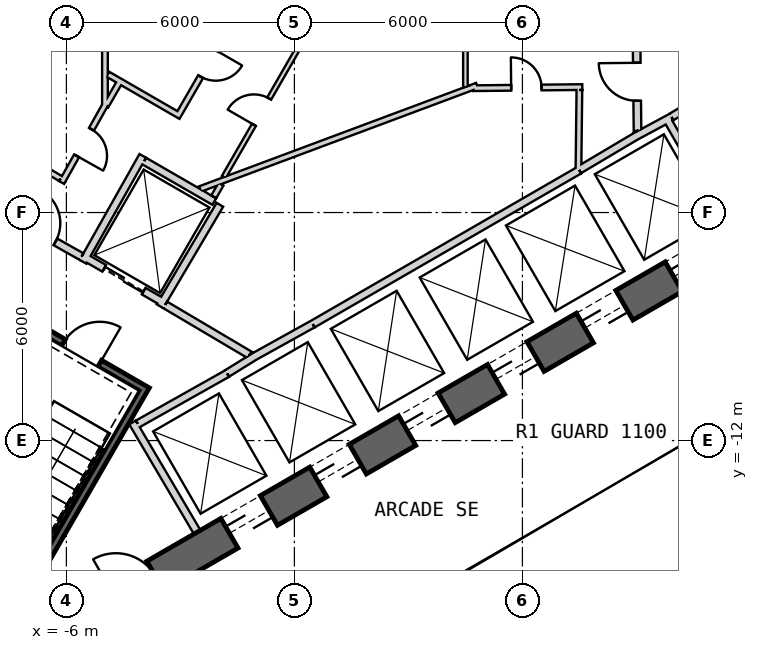
"""IFC4 building model, lengths in metres.
Left out: names, types, materials, properties, quantities, classifications, styles, units other than length and angle.
Written with IfcOpenShell. Run it as: python <this file> out.ifc"""

import sys

from ifc_helpers import new_model, si_unit, direction, frame, frame_2d, origin, place, context, subcontext, project, spatial, rectangle, extrude, element, fill, save


model = new_model("IFC4")
c1 = context("Model", 3, precision=1e-05, world=origin(), true_north=direction((0.0, 1.0)))
c2 = subcontext(c1, "Body", "Model", "MODEL_VIEW")
j1 = project(units=[si_unit("LENGTHUNIT", "METRE"), si_unit("PLANEANGLEUNIT", "RADIAN")], contexts=[c1])
p1 = place(None, origin())
s1 = spatial("IfcSite", under=j1, at=p1, CompositionType="ELEMENT")
p2 = place(p1, origin())
s2 = spatial("IfcBuilding", under=s1, at=p2, CompositionType="ELEMENT")
p3 = place(p2, frame((0.0, 0.0, 15.5)))
s3 = spatial("IfcBuildingStorey", under=s2, at=p3, CompositionType="ELEMENT", Elevation=15.5)
p4 = place(p3, frame((-7.825, -17.97, 0.0), z_axis=(0.0, 0.0, 1.0), x_axis=(0.866028369851, 0.499994862586, 0.0)))
e1 = element("IfcWall", 1, at=p4, inside=s3, PredefinedType="SHEAR", context=c2, shape_type="SweptSolid", body=[
    extrude(rectangle(XDim=31.523, YDim=0.9, at=frame_2d((15.762, 0.0))), origin(), (0.0, 0.0, 1.0), 6.0),
])
p5 = place(p4, frame((7.062, 0.0, 0.0)))
e2 = element("IfcOpeningElement", 2, at=p5, cuts=e1, PredefinedType="OPENING", context=c2, shape_type="SweptSolid", body=[
    extrude(rectangle(XDim=1.2, YDim=2.4, at=frame_2d((0.6, 1.2))), frame((0.0, 0.46, 0.0), z_axis=(0.0, -1.0, 0.0), x_axis=(1.0, 0.0, 0.0)), (0.0, 0.0, 1.0), 0.92),
])
p6 = place(p4, frame((9.762, 0.0, 0.0)))
e3 = element("IfcOpeningElement", 3, at=p6, cuts=e1, PredefinedType="OPENING", context=c2, shape_type="SweptSolid", body=[
    extrude(rectangle(XDim=1.2, YDim=2.4, at=frame_2d((0.6, 1.2))), frame((0.0, 0.46, 0.0), z_axis=(0.0, -1.0, 0.0), x_axis=(1.0, 0.0, 0.0)), (0.0, 0.0, 1.0), 0.92),
])
p7 = place(p4, frame((12.462, 0.0, 0.0)))
e4 = element("IfcOpeningElement", 4, at=p7, cuts=e1, PredefinedType="OPENING", context=c2, shape_type="SweptSolid", body=[
    extrude(rectangle(XDim=1.2, YDim=2.4, at=frame_2d((0.6, 1.2))), frame((0.0, 0.46, 0.0), z_axis=(0.0, -1.0, 0.0), x_axis=(1.0, 0.0, 0.0)), (0.0, 0.0, 1.0), 0.92),
])
p8 = place(p4, frame((15.162, 0.0, 0.0)))
e5 = element("IfcOpeningElement", 5, at=p8, cuts=e1, PredefinedType="OPENING", context=c2, shape_type="SweptSolid", body=[
    extrude(rectangle(XDim=1.2, YDim=2.4, at=frame_2d((0.6, 1.2))), frame((0.0, 0.46, 0.0), z_axis=(0.0, -1.0, 0.0), x_axis=(1.0, 0.0, 0.0)), (0.0, 0.0, 1.0), 0.92),
])
p9 = place(p4, frame((17.862, 0.0, 0.0)))
e6 = element("IfcOpeningElement", 6, at=p9, cuts=e1, PredefinedType="OPENING", context=c2, shape_type="SweptSolid", body=[
    extrude(rectangle(XDim=1.2, YDim=2.4, at=frame_2d((0.6, 1.2))), frame((0.0, 0.46, 0.0), z_axis=(0.0, -1.0, 0.0), x_axis=(1.0, 0.0, 0.0)), (0.0, 0.0, 1.0), 0.92),
])
p10 = place(p4, frame((20.562, 0.0, 0.0)))
e7 = element("IfcOpeningElement", 7, at=p10, cuts=e1, PredefinedType="OPENING", context=c2, shape_type="SweptSolid", body=[
    extrude(rectangle(XDim=1.2, YDim=2.4, at=frame_2d((0.6, 1.2))), frame((0.0, 0.46, 0.0), z_axis=(0.0, -1.0, 0.0), x_axis=(1.0, 0.0, 0.0)), (0.0, 0.0, 1.0), 0.92),
])
p11 = place(p4, frame((26.712, 0.0, 0.0)))
e8 = element("IfcOpeningElement", 8, at=p11, cuts=e1, PredefinedType="OPENING", context=c2, shape_type="SweptSolid", body=[
    extrude(rectangle(XDim=1.2, YDim=2.4, at=frame_2d((0.6, 1.2))), frame((0.0, 0.46, 0.0), z_axis=(0.0, -1.0, 0.0), x_axis=(1.0, 0.0, 0.0)), (0.0, 0.0, 1.0), 0.92),
])
p12 = place(p4, frame((3.612, 0.0, 0.0)))
e9 = element("IfcOpeningElement", 9, at=p12, cuts=e1, PredefinedType="OPENING", context=c2, shape_type="SweptSolid", body=[
    extrude(rectangle(XDim=1.2, YDim=2.4, at=frame_2d((0.6, 1.2))), frame((0.0, 0.46, 0.0), z_axis=(0.0, -1.0, 0.0), x_axis=(1.0, 0.0, 0.0)), (0.0, 0.0, 1.0), 0.92),
])
p13 = place(p3, frame((0.483, -8.936, 0.0), z_axis=(0.0, 0.0, 1.0), x_axis=(0.866030989016, 0.499990325971, 0.0)))
e10 = element("IfcWall", 10, at=p13, inside=s3, PredefinedType="PLUMBINGWALL", context=c2, shape_type="SweptSolid", body=[
    extrude(rectangle(XDim=8.1, YDim=0.2, at=frame_2d((4.05, 0.0))), origin(), (0.0, 0.0, 1.0), 5.7),
])
p14 = place(p3, frame((9.795, -3.525, 0.0), z_axis=(0.0, 0.0, 1.0), x_axis=(0.499984717929, -0.866034226713, 0.0)))
e11 = element("IfcWall", 11, at=p14, inside=s3, PredefinedType="PLUMBINGWALL", context=c2, shape_type="SweptSolid", body=[
    extrude(rectangle(XDim=3.25, YDim=0.2, at=frame_2d((1.625, 0.0))), origin(), (0.0, 0.0, 1.0), 5.7),
])
p15 = place(p3, frame((8.974, -3.999, 0.0), z_axis=(0.0, 0.0, 1.0), x_axis=(0.880907015104, 0.473289373154, 0.0)))
e12 = element("IfcWall", 12, at=p15, inside=s3, PredefinedType="PLUMBINGWALL", context=c2, shape_type="SweptSolid", body=[
    extrude(rectangle(XDim=1.078, YDim=0.2, at=frame_2d((0.539, 0.0))), origin(), (0.0, 0.0, 1.0), 5.7),
])
p16 = place(p3, frame((7.493, -4.878, 0.0), z_axis=(0.0, 0.0, 1.0), x_axis=(0.859981807212, 0.510324691999, 0.0)))
e13 = element("IfcWall", 13, at=p16, inside=s3, PredefinedType="PLUMBINGWALL", context=c2, shape_type="SweptSolid", body=[
    extrude(rectangle(XDim=1.845, YDim=0.2, at=frame_2d((0.922, 0.0))), origin(), (0.0, 0.0, 1.0), 5.7),
])
p17 = place(p3, frame((-2.558, -14.409, 0.0), z_axis=(0.0, 0.0, 1.0), x_axis=(-0.507997497166, 0.861358544901, 0.0)))
e14 = element("IfcWall", 14, at=p17, inside=s3, PredefinedType="PLUMBINGWALL", context=c2, shape_type="SweptSolid", body=[
    extrude(rectangle(XDim=3.35, YDim=0.2, at=frame_2d((1.675, 0.0))), origin(), (0.0, 0.0, 1.0), 5.7),
])
p18 = place(p3, frame((-1.769, -10.237, 0.0), z_axis=(0.0, 0.0, 1.0), x_axis=(-0.871534483978, -0.490334215854, 0.0)))
e15 = element("IfcWall", 15, at=p18, inside=s3, PredefinedType="PLUMBINGWALL", context=c2, shape_type="SweptSolid", body=[
    extrude(rectangle(XDim=2.7, YDim=0.2, at=frame_2d((1.35, 0.0))), origin(), (0.0, 0.0, 1.0), 5.7),
])
p19 = place(p3, frame((-1.024, -9.771, 0.0), z_axis=(0.0, 0.0, 1.0), x_axis=(-0.850348075135, -0.526220629693, 0.0)))
e16 = element("IfcWall", 16, at=p19, inside=s3, PredefinedType="PLUMBINGWALL", context=c2, shape_type="SweptSolid", body=[
    extrude(rectangle(XDim=0.878, YDim=0.2, at=frame_2d((0.439, 0.0))), origin(), (0.0, 0.0, 1.0), 5.7),
])
p20 = place(p3, frame((-1.13, -9.831, 0.0), z_axis=(0.0, 0.0, 1.0), x_axis=(0.874269620932, 0.485440655401, 0.0)))
e17 = element("IfcWall", 17, at=p20, inside=s3, PredefinedType="PLUMBINGWALL", context=c2, shape_type="SweptSolid", body=[
    extrude(rectangle(XDim=1.845, YDim=0.2, at=frame_2d((0.922, 0.0))), origin(), (0.0, 0.0, 1.0), 5.7),
])
p21 = place(p3, frame((-3.905, -10.563, -0.3), z_axis=(0.0, 0.0, 1.0), x_axis=(-0.500012932018, -0.866017937352, 0.0)))
e18 = element("IfcWall", 18, at=p21, inside=s3, PredefinedType="SHEAR", context=c2, shape_type="SweptSolid", body=[
    extrude(rectangle(XDim=8.1, YDim=0.2, at=frame_2d((4.05, 0.0))), origin(), (0.0, 0.0, 1.0), 6.0),
])
p22 = place(p3, frame((-4.041, -10.599, -0.3), z_axis=(0.0, 0.0, 1.0), x_axis=(-0.866047807691, 0.499961193289, 0.0)))
e19 = element("IfcWall", 19, at=p22, inside=s3, PredefinedType="SHEAR", context=c2, shape_type="SweptSolid", body=[
    extrude(rectangle(XDim=3.6, YDim=0.2, at=frame_2d((1.8, 0.0))), origin(), (0.0, 0.0, 1.0), 6.0),
])
p23 = place(p22, frame((1.25, 0.0, 0.3)))
e20 = element("IfcOpeningElement", 20, at=p23, cuts=e19, PredefinedType="OPENING", context=c2, shape_type="SweptSolid", body=[
    extrude(rectangle(XDim=1.1, YDim=2.1, at=frame_2d((0.55, 1.05))), frame((0.0, 0.11, 0.0), z_axis=(0.0, -1.0, 0.0), x_axis=(1.0, 0.0, 0.0)), (0.0, 0.0, 1.0), 0.22),
])
p24 = place(p3, frame((-3.446, -8.368, 0.0), z_axis=(0.0, 0.0, 1.0), x_axis=(-0.866024647952, 0.500001309137, 0.0)))
e21 = element("IfcWall", 21, at=p24, inside=s3, PredefinedType="PLUMBINGWALL", context=c2, shape_type="SweptSolid", body=[
    extrude(rectangle(XDim=2.4, YDim=0.2, at=frame_2d((1.2, 0.0))), origin(), (0.0, 0.0, 1.0), 5.7),
])
p25 = place(p24, frame((0.6, 0.0, 0.0)))
e22 = element("IfcOpeningElement", 22, at=p25, cuts=e21, PredefinedType="OPENING", context=c2, shape_type="SweptSolid", body=[
    extrude(rectangle(XDim=1.2, YDim=2.4, at=frame_2d((0.6, 1.2))), frame((0.0, 0.11, 0.0), z_axis=(0.0, -1.0, 0.0), x_axis=(1.0, 0.0, 0.0)), (0.0, 0.0, 1.0), 0.22),
])
p26 = place(p3, frame((-1.961, -5.796, 0.0), z_axis=(0.0, 0.0, 1.0), x_axis=(-0.508647062354, -0.860975125052, 0.0)))
e23 = element("IfcWall", 23, at=p26, inside=s3, PredefinedType="PLUMBINGWALL", context=c2, shape_type="SweptSolid", body=[
    extrude(rectangle(XDim=3.1, YDim=0.2, at=frame_2d((1.55, 0.0))), origin(), (0.0, 0.0, 1.0), 5.7),
])
p27 = place(p3, frame((-3.99, -4.509, 0.0), z_axis=(0.0, 0.0, 1.0), x_axis=(-0.491358283181, -0.870957540612, 0.0)))
e24 = element("IfcWall", 24, at=p27, inside=s3, PredefinedType="PLUMBINGWALL", context=c2, shape_type="SweptSolid", body=[
    extrude(rectangle(XDim=3.2, YDim=0.2, at=frame_2d((1.6, 0.0))), origin(), (0.0, 0.0, 1.0), 5.7),
])
p28 = place(p3, frame((-3.953, -4.646, 0.0), z_axis=(0.0, 0.0, 1.0), x_axis=(0.866040491692, -0.499973866067, 0.0)))
e25 = element("IfcWall", 25, at=p28, inside=s3, PredefinedType="PLUMBINGWALL", context=c2, shape_type="SweptSolid", body=[
    extrude(rectangle(XDim=2.129, YDim=0.2, at=frame_2d((1.065, 0.0))), origin(), (0.0, 0.0, 1.0), 5.7),
])
p29 = place(p3, frame((12.245, -2.109, 0.0), z_axis=(0.0, 0.0, 1.0), x_axis=(-0.860414880418, -0.509594185166, 0.0)))
e26 = element("IfcWall", 26, at=p29, inside=s3, PredefinedType="PARTITIONING", context=c2, shape_type="SweptSolid", body=[
    extrude(rectangle(XDim=2.7, YDim=0.2, at=frame_2d((1.35, 0.0))), origin(), (0.0, 0.0, 1.0), 5.7),
])
p30 = place(p3, frame((9.029, -3.851, 0.0), z_axis=(0.0, 0.0, 1.0), x_axis=(-0.010783593937, 0.99994185536, 0.0)))
e27 = element("IfcWall", 27, at=p30, inside=s3, PredefinedType="PARTITIONING", context=c2, shape_type="SweptSolid", body=[
    extrude(rectangle(XDim=2.581, YDim=0.2, at=frame_2d((1.291, 0.0))), origin(), (0.0, 0.0, 1.0), 5.7),
])
p31 = place(p30, frame((0.791, 0.0, 0.0)))
e28 = element("IfcOpeningElement", 28, at=p31, cuts=e27, PredefinedType="OPENING", context=c2, shape_type="SweptSolid", body=[
    extrude(rectangle(XDim=1.0, YDim=2.1, at=frame_2d((0.5, 1.05))), frame((0.0, 0.11, 0.0), z_axis=(0.0, -1.0, 0.0), x_axis=(1.0, 0.0, 0.0)), (0.0, 0.0, 1.0), 0.22),
])
p32 = place(p3, frame((-3.401, -8.43, 0.0), z_axis=(0.0, 0.0, 1.0), x_axis=(0.860615607571, -0.509255118781, 0.0)))
e29 = element("IfcWall", 29, at=p32, inside=s3, PredefinedType="PARTITIONING", context=c2, shape_type="SweptSolid", body=[
    extrude(rectangle(XDim=2.581, YDim=0.2, at=frame_2d((1.29, 0.0))), origin(), (0.0, 0.0, 1.0), 5.7),
])
p33 = place(p3, frame((-7.849, -5.894, 0.0), z_axis=(0.0, 0.0, 1.0), x_axis=(0.871363259478, -0.490638431059, 0.0)))
e30 = element("IfcWall", 30, at=p33, inside=s3, PredefinedType="PARTITIONING", context=c2, shape_type="SweptSolid", body=[
    extrude(rectangle(XDim=2.581, YDim=0.2, at=frame_2d((1.291, 0.0))), origin(), (0.0, 0.0, 1.0), 5.7),
])
p34 = place(p33, frame((0.791, 0.0, 0.0)))
e31 = element("IfcOpeningElement", 31, at=p34, cuts=e30, PredefinedType="OPENING", context=c2, shape_type="SweptSolid", body=[
    extrude(rectangle(XDim=1.0, YDim=2.1, at=frame_2d((0.5, 1.05))), frame((0.0, 0.11, 0.0), z_axis=(0.0, -1.0, 0.0), x_axis=(1.0, 0.0, 0.0)), (0.0, 0.0, 1.0), 0.22),
])
p35 = place(p3, frame((4.807, -2.659, 0.0), z_axis=(0.0, 0.0, 1.0), x_axis=(-0.936818342118, -0.349816228714, 0.0)))
e32 = element("IfcWall", 32, at=p35, inside=s3, PredefinedType="PLUMBINGWALL", context=c2, shape_type="SweptSolid", body=[
    extrude(rectangle(XDim=7.78, YDim=0.15, at=frame_2d((3.89, 0.0))), origin(), (0.0, 0.0, 1.0), 5.7),
])
p36 = place(p3, frame((0.182, -1.535, 0.0), z_axis=(0.0, 0.0, 1.0), x_axis=(-0.499988401207, -0.866032100247, 0.0)))
e33 = element("IfcWall", 33, at=p36, inside=s3, PredefinedType="PARTITIONING", context=c2, shape_type="SweptSolid", body=[
    extrude(rectangle(XDim=4.079, YDim=0.12, at=frame_2d((2.04, 0.0))), origin(), (0.0, 0.0, 1.0), 5.7),
])
p37 = place(p36, frame((1.691, 0.0, 0.0)))
e34 = element("IfcOpeningElement", 34, at=p37, cuts=e33, PredefinedType="OPENING", context=c2, shape_type="SweptSolid", body=[
    extrude(rectangle(XDim=0.8, YDim=2.1, at=frame_2d((0.4, 1.05))), frame((0.0, 0.07, 0.0), z_axis=(0.0, -1.0, 0.0), x_axis=(1.0, 0.0, 0.0)), (0.0, 0.0, 1.0), 0.14),
])
p38 = place(p3, frame((4.5, -2.7, 0.0), z_axis=(0.0, 0.0, 1.0), x_axis=(0.0, 1.0, 0.0)))
e35 = element("IfcWall", 35, at=p38, inside=s3, PredefinedType="PARTITIONING", context=c2, shape_type="SweptSolid", body=[
    extrude(rectangle(XDim=1.715, YDim=0.12, at=frame_2d((0.857, 0.0))), origin(), (0.0, 0.0, 1.0), 5.7),
])
p39 = place(p3, frame((-1.932, -5.256, 0.0), z_axis=(0.0, 0.0, 1.0), x_axis=(-0.499777709171, -0.866153705422, 0.0)))
e36 = element("IfcWall", 36, at=p39, inside=s3, PredefinedType="PLUMBINGWALL", context=c2, shape_type="SweptSolid", body=[
    extrude(rectangle(XDim=0.383, YDim=0.15, at=frame_2d((0.191, 0.0))), origin(), (0.0, 0.0, 1.0), 5.7),
])
p40 = place(p3, frame((7.575, -2.699, 0.0), z_axis=(0.0, 0.0, 1.0), x_axis=(-0.999947791603, -0.010218320275, 0.0)))
e37 = element("IfcWall", 37, at=p40, inside=s3, PredefinedType="PLUMBINGWALL", context=c2, shape_type="SweptSolid", body=[
    extrude(rectangle(XDim=2.867, YDim=0.15, at=frame_2d((1.434, 0.0))), origin(), (0.0, 0.0, 1.0), 5.7),
])
p41 = place(p40, frame((1.071, 0.0, 0.0)))
e38 = element("IfcOpeningElement", 38, at=p41, cuts=e37, PredefinedType="OPENING", context=c2, shape_type="SweptSolid", body=[
    extrude(rectangle(XDim=0.8, YDim=2.1, at=frame_2d((0.4, 1.05))), frame((0.0, 0.085, 0.0), z_axis=(0.0, -1.0, 0.0), x_axis=(1.0, 0.0, 0.0)), (0.0, 0.0, 1.0), 0.17),
])
p42 = place(p3, frame((7.475, -4.865, 0.0), z_axis=(0.0, 0.0, 1.0), x_axis=(0.011682810534, 0.99993175364, 0.0)))
e39 = element("IfcWall", 39, at=p42, inside=s3, PredefinedType="PLUMBINGWALL", context=c2, shape_type="SweptSolid", body=[
    extrude(rectangle(XDim=2.09, YDim=0.15, at=frame_2d((1.045, 0.0))), origin(), (0.0, 0.0, 1.0), 5.7),
])
p43 = place(p3, frame((-4.985, -3.235, 0.0), z_axis=(0.0, 0.0, 1.0), x_axis=(0.0, 1.0, 0.0)))
e40 = element("IfcWall", 40, at=p43, inside=s3, PredefinedType="PLUMBINGWALL", context=c2, shape_type="SweptSolid", body=[
    extrude(rectangle(XDim=6.469, YDim=0.15, at=frame_2d((3.235, 0.0))), origin(), (0.0, 0.0, 1.0), 5.7),
])
p44 = place(p3, frame((-6.125, -5.211, 0.0), z_axis=(0.0, 0.0, 1.0), x_axis=(0.488762436737, 0.87241691893, 0.0)))
e41 = element("IfcWall", 41, at=p44, inside=s3, PredefinedType="PLUMBINGWALL", context=c2, shape_type="SweptSolid", body=[
    extrude(rectangle(XDim=2.337, YDim=0.15, at=frame_2d((1.168, 0.0))), origin(), (0.0, 0.0, 1.0), 5.7),
])
p45 = place(p44, frame((0.806, 0.0, 0.0)))
e42 = element("IfcOpeningElement", 42, at=p45, cuts=e41, PredefinedType="OPENING", context=c2, shape_type="SweptSolid", body=[
    extrude(rectangle(XDim=0.8, YDim=2.1, at=frame_2d((0.4, 1.05))), frame((0.0, 0.085, 0.0), z_axis=(0.0, -1.0, 0.0), x_axis=(1.0, 0.0, 0.0)), (0.0, 0.0, 1.0), 0.17),
])
p46 = place(p3, frame((-7.95, -4.041, 0.0), z_axis=(0.0, 0.0, 1.0), x_axis=(0.860090281069, -0.510141851263, 0.0)))
e43 = element("IfcWall", 43, at=p46, inside=s3, PredefinedType="PLUMBINGWALL", context=c2, shape_type="SweptSolid", body=[
    extrude(rectangle(XDim=2.089, YDim=0.15, at=frame_2d((1.045, 0.0))), origin(), (0.0, 0.0, 1.0), 5.7),
])
p47 = place(p3, frame((-3.089, -3.5, 0.0), z_axis=(0.0, 0.0, 1.0), x_axis=(0.500025362525, 0.866010760229, 0.0)))
e44 = element("IfcWall", 44, at=p47, inside=s3, PredefinedType="PLUMBINGWALL", context=c2, shape_type="SweptSolid", body=[
    extrude(rectangle(XDim=3.209, YDim=0.15, at=frame_2d((1.604, 0.0))), origin(), (0.0, 0.0, 1.0), 5.7),
])
p48 = place(p47, frame((1.242, 0.0, 0.0)))
e45 = element("IfcOpeningElement", 45, at=p48, cuts=e44, PredefinedType="OPENING", context=c2, shape_type="SweptSolid", body=[
    extrude(rectangle(XDim=0.8, YDim=2.1, at=frame_2d((0.4, 1.05))), frame((0.0, 0.085, 0.0), z_axis=(0.0, -1.0, 0.0), x_axis=(1.0, 0.0, 0.0)), (0.0, 0.0, 1.0), 0.17),
])
p49 = place(p3, frame((-4.91, -2.361, 0.0), z_axis=(0.0, 0.0, 1.0), x_axis=(0.866022705876, -0.500004672885, 0.0)))
e46 = element("IfcWall", 46, at=p49, inside=s3, PredefinedType="PLUMBINGWALL", context=c2, shape_type="SweptSolid", body=[
    extrude(rectangle(XDim=2.072, YDim=0.15, at=frame_2d((1.036, 0.0))), origin(), (0.0, 0.0, 1.0), 5.7),
])
p50 = place(p3, frame((-4.957, -3.187, 0.0), z_axis=(0.0, 0.0, 1.0), x_axis=(0.499860530385, 0.866105911632, 0.0)))
e47 = element("IfcWall", 47, at=p50, inside=s3, PredefinedType="PLUMBINGWALL", context=c2, shape_type="SweptSolid", body=[
    extrude(rectangle(XDim=0.663, YDim=0.15, at=frame_2d((0.332, 0.0))), origin(), (0.0, 0.0, 1.0), 5.7),
])
p51 = place(p31, origin())
e48 = element("IfcDoor", 48, at=p51, inside=s3, OperationType="SINGLE_SWING_RIGHT", PredefinedType="USERDEFINED", context=c2, shape_type="SweptSolid", body=[
    extrude(rectangle(XDim=1.0, YDim=2.1, at=frame_2d((0.5, 1.05))), frame((0.0, 0.025, 0.0), z_axis=(0.0, -1.0, 0.0), x_axis=(1.0, 0.0, 0.0)), (0.0, 0.0, 1.0), 0.05),
])
fill(e28, e48)
p52 = place(p23, origin())
e49 = element("IfcDoor", 49, at=p52, inside=s3, OperationType="SINGLE_SWING_LEFT", PredefinedType="USERDEFINED", context=c2, shape_type="SweptSolid", body=[
    extrude(rectangle(XDim=1.1, YDim=2.1, at=frame_2d((0.55, 1.05))), frame((0.0, 0.025, 0.0), z_axis=(0.0, -1.0, 0.0), x_axis=(1.0, 0.0, 0.0)), (0.0, 0.0, 1.0), 0.05),
])
fill(e20, e49)
p53 = place(p34, origin())
e50 = element("IfcDoor", 50, at=p53, inside=s3, OperationType="SINGLE_SWING_LEFT", PredefinedType="USERDEFINED", context=c2, shape_type="SweptSolid", body=[
    extrude(rectangle(XDim=1.0, YDim=2.1, at=frame_2d((0.5, 1.05))), frame((0.0, 0.025, 0.0), z_axis=(0.0, -1.0, 0.0), x_axis=(1.0, 0.0, 0.0)), (0.0, 0.0, 1.0), 0.05),
])
fill(e31, e50)
p54 = place(p25, origin())
e51 = element("IfcDoor", 51, at=p54, inside=s3, OperationType="SLIDING_TO_LEFT", PredefinedType="USERDEFINED", context=c2, shape_type="SweptSolid", body=[
    extrude(rectangle(XDim=1.2, YDim=2.4, at=frame_2d((0.6, 1.2))), frame((0.0, 0.025, 0.0), z_axis=(0.0, -1.0, 0.0), x_axis=(1.0, 0.0, 0.0)), (0.0, 0.0, 1.0), 0.05),
])
fill(e22, e51)
p55 = place(p37, origin())
e52 = element("IfcDoor", 52, at=p55, inside=s3, OperationType="SINGLE_SWING_RIGHT", PredefinedType="USERDEFINED", context=c2, shape_type="SweptSolid", body=[
    extrude(rectangle(XDim=0.8, YDim=2.1, at=frame_2d((0.4, 1.05))), frame((0.0, 0.025, 0.0), z_axis=(0.0, -1.0, 0.0), x_axis=(1.0, 0.0, 0.0)), (0.0, 0.0, 1.0), 0.05),
])
fill(e34, e52)
p56 = place(p41, origin())
e53 = element("IfcDoor", 53, at=p56, inside=s3, OperationType="SINGLE_SWING_RIGHT", PredefinedType="USERDEFINED", context=c2, shape_type="SweptSolid", body=[
    extrude(rectangle(XDim=0.8, YDim=2.1, at=frame_2d((0.4, 1.05))), frame((0.0, 0.025, 0.0), z_axis=(0.0, -1.0, 0.0), x_axis=(1.0, 0.0, 0.0)), (0.0, 0.0, 1.0), 0.05),
])
fill(e38, e53)
p57 = place(p45, origin())
e54 = element("IfcDoor", 54, at=p57, inside=s3, OperationType="SINGLE_SWING_LEFT", PredefinedType="USERDEFINED", context=c2, shape_type="SweptSolid", body=[
    extrude(rectangle(XDim=0.8, YDim=2.1, at=frame_2d((0.4, 1.05))), frame((0.0, 0.025, 0.0), z_axis=(0.0, -1.0, 0.0), x_axis=(1.0, 0.0, 0.0)), (0.0, 0.0, 1.0), 0.05),
])
fill(e42, e54)
p58 = place(p48, origin())
e55 = element("IfcDoor", 55, at=p58, inside=s3, OperationType="SINGLE_SWING_RIGHT", PredefinedType="USERDEFINED", context=c2, shape_type="SweptSolid", body=[
    extrude(rectangle(XDim=0.8, YDim=2.1, at=frame_2d((0.4, 1.05))), frame((0.0, 0.025, 0.0), z_axis=(0.0, -1.0, 0.0), x_axis=(1.0, 0.0, 0.0)), (0.0, 0.0, 1.0), 0.05),
])
fill(e45, e55)
p59 = place(p5, origin())
e56 = element("IfcDoor", 56, at=p59, inside=s3, OperationType="SLIDING_TO_LEFT", PredefinedType="USERDEFINED", context=c2, shape_type="SweptSolid", body=[
    extrude(rectangle(XDim=1.2, YDim=2.4, at=frame_2d((0.6, 1.2))), frame((0.0, 0.025, 0.0), z_axis=(0.0, -1.0, 0.0), x_axis=(1.0, 0.0, 0.0)), (0.0, 0.0, 1.0), 0.05),
])
fill(e2, e56)
p60 = place(p6, origin())
e57 = element("IfcDoor", 57, at=p60, inside=s3, OperationType="SLIDING_TO_LEFT", PredefinedType="USERDEFINED", context=c2, shape_type="SweptSolid", body=[
    extrude(rectangle(XDim=1.2, YDim=2.4, at=frame_2d((0.6, 1.2))), frame((0.0, 0.025, 0.0), z_axis=(0.0, -1.0, 0.0), x_axis=(1.0, 0.0, 0.0)), (0.0, 0.0, 1.0), 0.05),
])
fill(e3, e57)
p61 = place(p7, origin())
e58 = element("IfcDoor", 58, at=p61, inside=s3, OperationType="SLIDING_TO_LEFT", PredefinedType="USERDEFINED", context=c2, shape_type="SweptSolid", body=[
    extrude(rectangle(XDim=1.2, YDim=2.4, at=frame_2d((0.6, 1.2))), frame((0.0, 0.025, 0.0), z_axis=(0.0, -1.0, 0.0), x_axis=(1.0, 0.0, 0.0)), (0.0, 0.0, 1.0), 0.05),
])
fill(e4, e58)
p62 = place(p8, origin())
e59 = element("IfcDoor", 59, at=p62, inside=s3, OperationType="SLIDING_TO_LEFT", PredefinedType="USERDEFINED", context=c2, shape_type="SweptSolid", body=[
    extrude(rectangle(XDim=1.2, YDim=2.4, at=frame_2d((0.6, 1.2))), frame((0.0, 0.025, 0.0), z_axis=(0.0, -1.0, 0.0), x_axis=(1.0, 0.0, 0.0)), (0.0, 0.0, 1.0), 0.05),
])
fill(e5, e59)
p63 = place(p9, origin())
e60 = element("IfcDoor", 60, at=p63, inside=s3, OperationType="SLIDING_TO_LEFT", PredefinedType="USERDEFINED", context=c2, shape_type="SweptSolid", body=[
    extrude(rectangle(XDim=1.2, YDim=2.4, at=frame_2d((0.6, 1.2))), frame((0.0, 0.025, 0.0), z_axis=(0.0, -1.0, 0.0), x_axis=(1.0, 0.0, 0.0)), (0.0, 0.0, 1.0), 0.05),
])
fill(e6, e60)
p64 = place(p10, origin())
e61 = element("IfcDoor", 61, at=p64, inside=s3, OperationType="SLIDING_TO_LEFT", PredefinedType="USERDEFINED", context=c2, shape_type="SweptSolid", body=[
    extrude(rectangle(XDim=1.2, YDim=2.4, at=frame_2d((0.6, 1.2))), frame((0.0, 0.025, 0.0), z_axis=(0.0, -1.0, 0.0), x_axis=(1.0, 0.0, 0.0)), (0.0, 0.0, 1.0), 0.05),
])
fill(e7, e61)
save(model, sys.argv[1])
